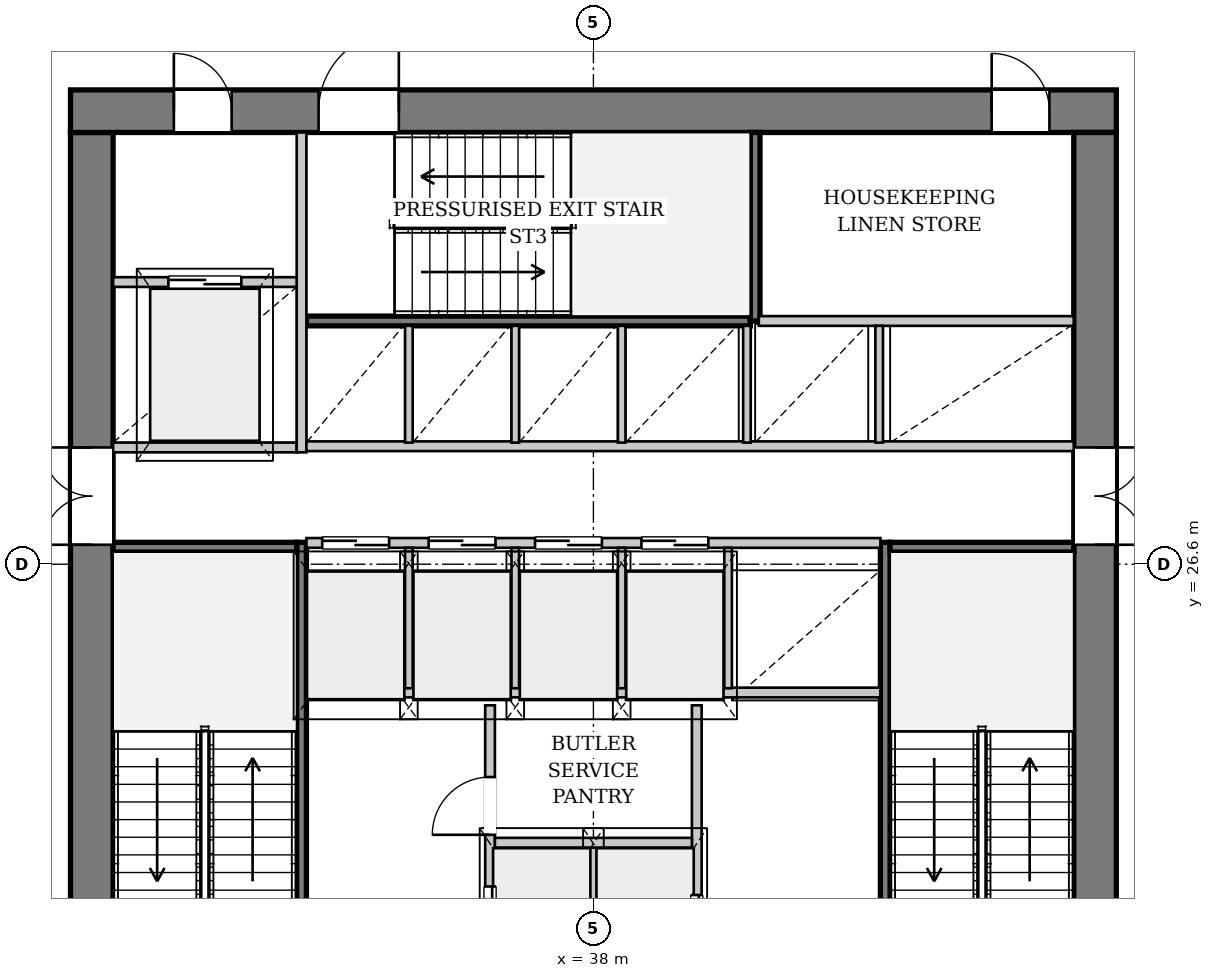
"""IFC4 building model, lengths in metres.
Left out: names, types, materials, properties, quantities, classifications, styles, units other than length and angle.
Written with IfcOpenShell. Run it as: python <this file> out.ifc"""

import sys

from ifc_helpers import new_model, si_unit, direction, frame, frame_2d, origin, place, context, subcontext, project, spatial, rectangle, extrude, source, transform, mapped, element, fill, save


model = new_model("IFC4")
c1 = context("Model", 3, precision=1e-05, world=origin(), true_north=direction((0.0, 1.0)))
c2 = subcontext(c1, "Body", "Model", "MODEL_VIEW")
j1 = project(units=[si_unit("LENGTHUNIT", "METRE"), si_unit("PLANEANGLEUNIT", "RADIAN")], contexts=[c1])
p1 = place(None, origin())
s1 = spatial("IfcSite", under=j1, at=p1, CompositionType="ELEMENT")
p2 = place(p1, origin())
s2 = spatial("IfcBuilding", under=s1, at=p2, CompositionType="ELEMENT")
p3 = place(p2, frame((0.0, 0.0, 123.45)))
s3 = spatial("IfcBuildingStorey", under=s2, at=p3, CompositionType="ELEMENT", Elevation=123.45)
p4 = place(p3, frame((29.75, 19.5, 0.0), z_axis=(0.0, 0.0, 1.0), x_axis=(0.0, 1.0, 0.0)))
e1 = element("IfcWall", 1, at=p4, inside=s3, PredefinedType="SHEAR", context=c2, shape_type="SweptSolid", body=[
    extrude(rectangle(XDim=14.2, YDim=0.7, at=frame_2d((7.1, 0.0))), origin(), (0.0, 0.0, 1.0), 3.3),
])
p5 = place(p4, frame((7.42, 0.0, 0.0)))
e2 = element("IfcOpeningElement", 2, at=p5, cuts=e1, PredefinedType="OPENING", context=c2, shape_type="SweptSolid", body=[
    extrude(rectangle(XDim=1.6, YDim=2.2, at=frame_2d((0.8, 1.1))), frame((0.0, 0.36, 0.0), z_axis=(0.0, -1.0, 0.0), x_axis=(1.0, 0.0, 0.0)), (0.0, 0.0, 1.0), 0.72),
])
p6 = place(p3, frame((29.4, 34.05, 0.0), z_axis=(0.0, 0.0, 1.0), x_axis=(1.0, 0.0, 0.0)))
e3 = element("IfcWall", 3, at=p6, inside=s3, PredefinedType="SHEAR", context=c2, shape_type="SweptSolid", body=[
    extrude(rectangle(XDim=17.2, YDim=0.7, at=frame_2d((8.6, 0.0))), origin(), (0.0, 0.0, 1.0), 3.3),
])
p7 = place(p6, frame((1.7, 0.0, 0.0)))
e4 = element("IfcOpeningElement", 4, at=p7, cuts=e3, PredefinedType="OPENING", context=c2, shape_type="SweptSolid", body=[
    extrude(rectangle(XDim=0.95, YDim=2.1, at=frame_2d((0.475, 1.05))), frame((0.0, 0.36, 0.0), z_axis=(0.0, -1.0, 0.0), x_axis=(1.0, 0.0, 0.0)), (0.0, 0.0, 1.0), 0.72),
])
p8 = place(p6, frame((4.08, 0.0, 0.0)))
e5 = element("IfcOpeningElement", 5, at=p8, cuts=e3, PredefinedType="OPENING", context=c2, shape_type="SweptSolid", body=[
    extrude(rectangle(XDim=1.32, YDim=2.2, at=frame_2d((0.66, 1.1))), frame((0.0, 0.36, 0.0), z_axis=(0.0, -1.0, 0.0), x_axis=(1.0, 0.0, 0.0)), (0.0, 0.0, 1.0), 0.72),
])
p9 = place(p6, frame((15.15, 0.0, 0.0)))
e6 = element("IfcOpeningElement", 6, at=p9, cuts=e3, PredefinedType="OPENING", context=c2, shape_type="SweptSolid", body=[
    extrude(rectangle(XDim=0.95, YDim=2.1, at=frame_2d((0.475, 1.05))), frame((0.0, 0.36, 0.0), z_axis=(0.0, -1.0, 0.0), x_axis=(1.0, 0.0, 0.0)), (0.0, 0.0, 1.0), 0.72),
])
p10 = place(p3, frame((46.25, 33.7, 0.0), z_axis=(0.0, 0.0, 1.0), x_axis=(0.0, -1.0, 0.0)))
e7 = element("IfcWall", 7, at=p10, inside=s3, PredefinedType="SHEAR", context=c2, shape_type="SweptSolid", body=[
    extrude(rectangle(XDim=14.2, YDim=0.7, at=frame_2d((7.1, 0.0))), origin(), (0.0, 0.0, 1.0), 3.3),
])
p11 = place(p10, frame((5.18, 0.0, 0.0)))
e8 = element("IfcOpeningElement", 8, at=p11, cuts=e7, PredefinedType="OPENING", context=c2, shape_type="SweptSolid", body=[
    extrude(rectangle(XDim=1.6, YDim=2.2, at=frame_2d((0.8, 1.1))), frame((0.0, 0.36, 0.0), z_axis=(0.0, -1.0, 0.0), x_axis=(1.0, 0.0, 0.0)), (0.0, 0.0, 1.0), 0.72),
])
p12 = place(p3, frame((33.2, 19.5, 0.0), z_axis=(0.0, 0.0, 1.0), x_axis=(0.0, 1.0, 0.0)))
e9 = element("IfcWall", 9, at=p12, inside=s3, PredefinedType="PARTITIONING", context=c2, shape_type="SweptSolid", body=[
    extrude(rectangle(XDim=7.46, YDim=0.16, at=frame_2d((3.73, 0.0))), origin(), (0.0, 0.0, 1.0), 3.3),
])
p13 = place(p12, frame((0.08, 0.0, 0.0)))
e10 = element("IfcOpeningElement", 10, at=p13, cuts=e9, PredefinedType="OPENING", context=c2, shape_type="SweptSolid", body=[
    extrude(rectangle(XDim=1.32, YDim=2.2, at=frame_2d((0.66, 1.1))), frame((0.0, 0.09, 0.0), z_axis=(0.0, -1.0, 0.0), x_axis=(1.0, 0.0, 0.0)), (0.0, 0.0, 1.0), 0.18),
])
p14 = place(p3, frame((30.1, 26.88, 0.0), z_axis=(0.0, 0.0, 1.0), x_axis=(1.0, 0.0, 0.0)))
e11 = element("IfcWall", 11, at=p14, inside=s3, PredefinedType="PARTITIONING", context=c2, shape_type="SweptSolid", body=[
    extrude(rectangle(XDim=3.02, YDim=0.16, at=frame_2d((1.51, 0.0))), origin(), (0.0, 0.0, 1.0), 3.3),
])
p15 = place(p3, frame((42.8, 26.96, 0.0), z_axis=(0.0, 0.0, 1.0), x_axis=(0.0, -1.0, 0.0)))
e12 = element("IfcWall", 12, at=p15, inside=s3, PredefinedType="PARTITIONING", context=c2, shape_type="SweptSolid", body=[
    extrude(rectangle(XDim=7.46, YDim=0.16, at=frame_2d((3.73, 0.0))), origin(), (0.0, 0.0, 1.0), 3.3),
])
p16 = place(p15, frame((6.06, 0.0, 0.0)))
e13 = element("IfcOpeningElement", 13, at=p16, cuts=e12, PredefinedType="OPENING", context=c2, shape_type="SweptSolid", body=[
    extrude(rectangle(XDim=1.32, YDim=2.2, at=frame_2d((0.66, 1.1))), frame((0.0, 0.09, 0.0), z_axis=(0.0, -1.0, 0.0), x_axis=(1.0, 0.0, 0.0)), (0.0, 0.0, 1.0), 0.18),
])
p17 = place(p3, frame((42.88, 26.88, 0.0), z_axis=(0.0, 0.0, 1.0), x_axis=(1.0, 0.0, 0.0)))
e14 = element("IfcWall", 14, at=p17, inside=s3, PredefinedType="PARTITIONING", context=c2, shape_type="SweptSolid", body=[
    extrude(rectangle(XDim=3.02, YDim=0.16, at=frame_2d((1.51, 0.0))), origin(), (0.0, 0.0, 1.0), 3.3),
])
p18 = place(p3, frame((33.28, 30.6, 0.0), z_axis=(0.0, 0.0, 1.0), x_axis=(1.0, 0.0, 0.0)))
e15 = element("IfcWall", 15, at=p18, inside=s3, PredefinedType="PARTITIONING", context=c2, shape_type="SweptSolid", body=[
    extrude(rectangle(XDim=7.3, YDim=0.16, at=frame_2d((3.65, 0.0))), origin(), (0.0, 0.0, 1.0), 3.3),
])
p19 = place(p3, frame((40.66, 30.6, 0.0), z_axis=(0.0, 0.0, 1.0), x_axis=(0.0, 1.0, 0.0)))
e16 = element("IfcWall", 16, at=p19, inside=s3, PredefinedType="PARTITIONING", context=c2, shape_type="SweptSolid", body=[
    extrude(rectangle(XDim=3.1, YDim=0.16, at=frame_2d((1.55, 0.0))), origin(), (0.0, 0.0, 1.0), 3.3),
])
p20 = place(p3, frame((36.3, 19.5, 0.0), z_axis=(0.0, 0.0, 1.0), x_axis=(0.0, 1.0, 0.0)))
e17 = element("IfcWall", 17, at=p20, inside=s3, PredefinedType="PARTITIONING", context=c2, shape_type="SweptSolid", body=[
    extrude(rectangle(XDim=4.78, YDim=0.16, at=frame_2d((2.39, 0.0))), origin(), (0.0, 0.0, 1.0), 3.3),
])
p21 = place(p20, frame((0.6, 0.0, 0.0)))
e18 = element("IfcOpeningElement", 18, at=p21, cuts=e17, PredefinedType="OPENING", context=c2, shape_type="SweptSolid", body=[
    extrude(rectangle(XDim=1.2, YDim=2.2, at=frame_2d((0.6, 1.1))), frame((0.0, 0.09, 0.0), z_axis=(0.0, -1.0, 0.0), x_axis=(1.0, 0.0, 0.0)), (0.0, 0.0, 1.0), 0.18),
])
p22 = place(p20, frame((2.65, 0.0, 0.0)))
e19 = element("IfcOpeningElement", 19, at=p22, cuts=e17, PredefinedType="OPENING", context=c2, shape_type="SweptSolid", body=[
    extrude(rectangle(XDim=0.95, YDim=2.1, at=frame_2d((0.475, 1.05))), frame((0.0, 0.09, 0.0), z_axis=(0.0, -1.0, 0.0), x_axis=(1.0, 0.0, 0.0)), (0.0, 0.0, 1.0), 0.18),
])
p23 = place(p3, frame((39.7, 24.28, 0.0), z_axis=(0.0, 0.0, 1.0), x_axis=(0.0, -1.0, 0.0)))
e20 = element("IfcWall", 20, at=p23, inside=s3, PredefinedType="PARTITIONING", context=c2, shape_type="SweptSolid", body=[
    extrude(rectangle(XDim=4.78, YDim=0.16, at=frame_2d((2.39, 0.0))), origin(), (0.0, 0.0, 1.0), 3.3),
])
p24 = place(p23, frame((3.12, 0.0, 0.0)))
e21 = element("IfcOpeningElement", 21, at=p24, cuts=e20, PredefinedType="OPENING", context=c2, shape_type="SweptSolid", body=[
    extrude(rectangle(XDim=1.2, YDim=2.2, at=frame_2d((0.6, 1.1))), frame((0.0, 0.09, 0.0), z_axis=(0.0, -1.0, 0.0), x_axis=(1.0, 0.0, 0.0)), (0.0, 0.0, 1.0), 0.18),
])
p25 = place(p3, frame((38.0, 19.5, 0.0), z_axis=(0.0, 0.0, 1.0), x_axis=(0.0, 1.0, 0.0)))
e22 = element("IfcWall", 22, at=p25, inside=s3, PredefinedType="PARTITIONING", context=c2, shape_type="SweptSolid", body=[
    extrude(rectangle(XDim=2.46, YDim=0.125, at=frame_2d((1.23, 0.0))), origin(), (0.0, 0.0, 1.0), 3.3),
])
p26 = place(p3, frame((36.38, 22.02, 0.0), z_axis=(0.0, 0.0, 1.0), x_axis=(1.0, 0.0, 0.0)))
e23 = element("IfcWall", 23, at=p26, inside=s3, PredefinedType="PARTITIONING", context=c2, shape_type="SweptSolid", body=[
    extrude(rectangle(XDim=3.24, YDim=0.16, at=frame_2d((1.62, 0.0))), origin(), (0.0, 0.0, 1.0), 3.3),
])
p27 = place(p3, frame((33.28, 24.49, 0.0), z_axis=(0.0, 0.0, 1.0), x_axis=(1.0, 0.0, 0.0)))
e24 = element("IfcWall", 24, at=p27, inside=s3, PredefinedType="PARTITIONING", context=c2, shape_type="SweptSolid", body=[
    extrude(rectangle(XDim=9.44, YDim=0.16, at=frame_2d((4.72, 0.0))), origin(), (0.0, 0.0, 1.0), 3.3),
])
p28 = place(p3, frame((30.1, 28.52, 0.0), z_axis=(0.0, 0.0, 1.0), x_axis=(1.0, 0.0, 0.0)))
e25 = element("IfcWall", 25, at=p28, inside=s3, PredefinedType="PARTITIONING", context=c2, shape_type="SweptSolid", body=[
    extrude(rectangle(XDim=3.02, YDim=0.16, at=frame_2d((1.51, 0.0))), origin(), (0.0, 0.0, 1.0), 3.3),
])
p29 = place(p3, frame((33.2, 28.44, 0.0), z_axis=(0.0, 0.0, 1.0), x_axis=(0.0, 1.0, 0.0)))
e26 = element("IfcWall", 26, at=p29, inside=s3, PredefinedType="PARTITIONING", context=c2, shape_type="SweptSolid", body=[
    extrude(rectangle(XDim=5.26, YDim=0.16, at=frame_2d((2.63, 0.0))), origin(), (0.0, 0.0, 1.0), 3.3),
])
p30 = place(p3, frame((30.1, 31.24, 0.0), z_axis=(0.0, 0.0, 1.0), x_axis=(1.0, 0.0, 0.0)))
e27 = element("IfcWall", 27, at=p30, inside=s3, PredefinedType="PARTITIONING", context=c2, shape_type="SweptSolid", body=[
    extrude(rectangle(XDim=3.02, YDim=0.16, at=frame_2d((1.51, 0.0))), origin(), (0.0, 0.0, 1.0), 3.3),
])
p31 = place(p30, frame((0.91, 0.0, 0.0)))
e28 = element("IfcOpeningElement", 28, at=p31, cuts=e27, PredefinedType="OPENING", context=c2, shape_type="SweptSolid", body=[
    extrude(rectangle(XDim=1.2, YDim=2.2, at=frame_2d((0.6, 1.1))), frame((0.0, 0.09, 0.0), z_axis=(0.0, -1.0, 0.0), x_axis=(1.0, 0.0, 0.0)), (0.0, 0.0, 1.0), 0.18),
])
p32 = place(p3, frame((33.28, 26.95, 0.0), z_axis=(0.0, 0.0, 1.0), x_axis=(1.0, 0.0, 0.0)))
e29 = element("IfcWall", 29, at=p32, inside=s3, PredefinedType="PARTITIONING", context=c2, shape_type="SweptSolid", body=[
    extrude(rectangle(XDim=9.44, YDim=0.16, at=frame_2d((4.72, 0.0))), origin(), (0.0, 0.0, 1.0), 3.3),
])
p33 = place(p32, frame((0.26, 0.0, 0.0)))
e30 = element("IfcOpeningElement", 30, at=p33, cuts=e29, PredefinedType="OPENING", context=c2, shape_type="SweptSolid", body=[
    extrude(rectangle(XDim=1.1, YDim=2.2, at=frame_2d((0.55, 1.1))), frame((0.0, 0.09, 0.0), z_axis=(0.0, -1.0, 0.0), x_axis=(1.0, 0.0, 0.0)), (0.0, 0.0, 1.0), 0.18),
])
p34 = place(p32, frame((2.01, 0.0, 0.0)))
e31 = element("IfcOpeningElement", 31, at=p34, cuts=e29, PredefinedType="OPENING", context=c2, shape_type="SweptSolid", body=[
    extrude(rectangle(XDim=1.1, YDim=2.2, at=frame_2d((0.55, 1.1))), frame((0.0, 0.09, 0.0), z_axis=(0.0, -1.0, 0.0), x_axis=(1.0, 0.0, 0.0)), (0.0, 0.0, 1.0), 0.18),
])
p35 = place(p32, frame((3.76, 0.0, 0.0)))
e32 = element("IfcOpeningElement", 32, at=p35, cuts=e29, PredefinedType="OPENING", context=c2, shape_type="SweptSolid", body=[
    extrude(rectangle(XDim=1.1, YDim=2.2, at=frame_2d((0.55, 1.1))), frame((0.0, 0.09, 0.0), z_axis=(0.0, -1.0, 0.0), x_axis=(1.0, 0.0, 0.0)), (0.0, 0.0, 1.0), 0.18),
])
p36 = place(p32, frame((5.51, 0.0, 0.0)))
e33 = element("IfcOpeningElement", 33, at=p36, cuts=e29, PredefinedType="OPENING", context=c2, shape_type="SweptSolid", body=[
    extrude(rectangle(XDim=1.1, YDim=2.2, at=frame_2d((0.55, 1.1))), frame((0.0, 0.09, 0.0), z_axis=(0.0, -1.0, 0.0), x_axis=(1.0, 0.0, 0.0)), (0.0, 0.0, 1.0), 0.18),
])
for number, where, z_axis, x_axis in (
    (34, (34.965, 24.56, 0.0), (0.0, 0.0, 1.0), (0.0, 1.0, 0.0)),
    (35, (36.715, 24.56, 0.0), (0.0, 0.0, 1.0), (0.0, 1.0, 0.0)),
    (36, (38.465, 24.56, 0.0), (0.0, 0.0, 1.0), (0.0, 1.0, 0.0)),
    (37, (40.215, 24.56, 0.0), (0.0, 0.0, 1.0), (0.0, 1.0, 0.0)),
):
    element("IfcWall", number, at=place(p3, frame(where, z_axis=z_axis, x_axis=x_axis)), inside=s3, PredefinedType="PARTITIONING", context=c2, shape_type="SweptSolid", body=[
        extrude(rectangle(XDim=2.31, YDim=0.125, at=frame_2d((1.155, 0.0))), origin(), (0.0, 0.0, 1.0), 3.3),
    ])
p37 = place(p3, frame((33.28, 28.54, 0.0), z_axis=(0.0, 0.0, 1.0), x_axis=(1.0, 0.0, 0.0)))
e38 = element("IfcWall", 38, at=p37, inside=s3, PredefinedType="PARTITIONING", context=c2, shape_type="SweptSolid", body=[
    extrude(rectangle(XDim=12.62, YDim=0.16, at=frame_2d((6.31, 0.0))), origin(), (0.0, 0.0, 1.0), 3.3),
])
p38 = place(p3, frame((40.72, 30.6, 0.0), z_axis=(0.0, 0.0, 1.0), x_axis=(1.0, 0.0, 0.0)))
e39 = element("IfcWall", 39, at=p38, inside=s3, PredefinedType="PARTITIONING", context=c2, shape_type="SweptSolid", body=[
    extrude(rectangle(XDim=5.18, YDim=0.16, at=frame_2d((2.59, 0.0))), origin(), (0.0, 0.0, 1.0), 3.3),
])
for number, where, z_axis, x_axis in (
    (40, (34.965, 28.6, 0.0), (0.0, 0.0, 1.0), (0.0, 1.0, 0.0)),
    (41, (36.715, 28.6, 0.0), (0.0, 0.0, 1.0), (0.0, 1.0, 0.0)),
    (42, (38.465, 28.6, 0.0), (0.0, 0.0, 1.0), (0.0, 1.0, 0.0)),
    (43, (40.525, 28.6, 0.0), (0.0, 0.0, 1.0), (0.0, 1.0, 0.0)),
    (44, (42.7, 28.6, 0.0), (0.0, 0.0, 1.0), (0.0, 1.0, 0.0)),
):
    element("IfcWall", number, at=place(p3, frame(where, z_axis=z_axis, x_axis=x_axis)), inside=s3, PredefinedType="PARTITIONING", context=c2, shape_type="SweptSolid", body=[
        extrude(rectangle(XDim=1.92, YDim=0.125, at=frame_2d((0.96, 0.0))), origin(), (0.0, 0.0, 1.0), 3.3),
    ])
m1 = source(origin(), c2, "Body", "SweptSolid", [
    extrude(rectangle(XDim=1.6, YDim=2.2, at=frame_2d((0.8, 1.1))), frame((0.0, 0.025, 0.0), z_axis=(0.0, -1.0, 0.0), x_axis=(1.0, 0.0, 0.0)), (0.0, 0.0, 1.0), 0.05),
])
p39 = place(p5, origin())
e45 = element("IfcDoor", 45, at=p39, inside=s3, OperationType="DOUBLE_DOOR_SINGLE_SWING", PredefinedType="DOOR", context=c2, shape_type="MappedRepresentation", body=[
    mapped(m1, transform((0.0, 0.0, 0.0), x_axis=(1.0, 0.0, 0.0), y_axis=(0.0, 1.0, 0.0), z_axis=(0.0, 0.0, 1.0), scale=1.0)),
])
fill(e2, e45)
m2 = source(origin(), c2, "Body", "SweptSolid", [
    extrude(rectangle(XDim=0.95, YDim=2.1, at=frame_2d((0.475, 1.05))), frame((0.0, 0.025, 0.0), z_axis=(0.0, -1.0, 0.0), x_axis=(1.0, 0.0, 0.0)), (0.0, 0.0, 1.0), 0.05),
])
p40 = place(p7, origin())
e46 = element("IfcDoor", 46, at=p40, inside=s3, OperationType="SINGLE_SWING_LEFT", PredefinedType="DOOR", context=c2, shape_type="MappedRepresentation", body=[
    mapped(m2, transform((0.0, 0.0, 0.0), x_axis=(1.0, 0.0, 0.0), y_axis=(0.0, 1.0, 0.0), z_axis=(0.0, 0.0, 1.0), scale=1.0)),
])
fill(e4, e46)
m3 = source(origin(), c2, "Body", "SweptSolid", [
    extrude(rectangle(XDim=1.32, YDim=2.2, at=frame_2d((0.66, 1.1))), frame((0.0, 0.025, 0.0), z_axis=(0.0, -1.0, 0.0), x_axis=(1.0, 0.0, 0.0)), (0.0, 0.0, 1.0), 0.05),
])
p41 = place(p8, origin())
e47 = element("IfcDoor", 47, at=p41, inside=s3, OperationType="SINGLE_SWING_RIGHT", PredefinedType="DOOR", context=c2, shape_type="MappedRepresentation", body=[
    mapped(m3, transform((0.0, 0.0, 0.0), x_axis=(1.0, 0.0, 0.0), y_axis=(0.0, 1.0, 0.0), z_axis=(0.0, 0.0, 1.0), scale=1.0)),
])
fill(e5, e47)
p42 = place(p11, origin())
e48 = element("IfcDoor", 48, at=p42, inside=s3, OperationType="DOUBLE_DOOR_SINGLE_SWING", PredefinedType="DOOR", context=c2, shape_type="MappedRepresentation", body=[
    mapped(m1, transform((0.0, 0.0, 0.0), x_axis=(1.0, 0.0, 0.0), y_axis=(0.0, 1.0, 0.0), z_axis=(0.0, 0.0, 1.0), scale=1.0)),
])
fill(e8, e48)
m4 = source(origin(), c2, "Body", "SweptSolid", [
    extrude(rectangle(XDim=1.2, YDim=2.2, at=frame_2d((0.6, 1.1))), frame((0.0, 0.025, 0.0), z_axis=(0.0, -1.0, 0.0), x_axis=(1.0, 0.0, 0.0)), (0.0, 0.0, 1.0), 0.05),
])
p43 = place(p21, origin())
e49 = element("IfcDoor", 49, at=p43, inside=s3, OperationType="DOUBLE_DOOR_SLIDING", PredefinedType="DOOR", context=c2, shape_type="MappedRepresentation", body=[
    mapped(m4, transform((0.0, 0.0, 0.0), x_axis=(1.0, 0.0, 0.0), y_axis=(0.0, 1.0, 0.0), z_axis=(0.0, 0.0, 1.0), scale=1.0)),
])
fill(e18, e49)
p44 = place(p22, origin())
e50 = element("IfcDoor", 50, at=p44, inside=s3, OperationType="SINGLE_SWING_LEFT", PredefinedType="DOOR", context=c2, shape_type="MappedRepresentation", body=[
    mapped(m2, transform((0.0, 0.0, 0.0), x_axis=(1.0, 0.0, 0.0), y_axis=(0.0, 1.0, 0.0), z_axis=(0.0, 0.0, 1.0), scale=1.0)),
])
fill(e19, e50)
p45 = place(p24, origin())
e51 = element("IfcDoor", 51, at=p45, inside=s3, OperationType="DOUBLE_DOOR_SLIDING", PredefinedType="DOOR", context=c2, shape_type="MappedRepresentation", body=[
    mapped(m4, transform((0.0, 0.0, 0.0), x_axis=(1.0, 0.0, 0.0), y_axis=(0.0, 1.0, 0.0), z_axis=(0.0, 0.0, 1.0), scale=1.0)),
])
fill(e21, e51)
p46 = place(p31, origin())
e52 = element("IfcDoor", 52, at=p46, inside=s3, OperationType="DOUBLE_DOOR_SLIDING", PredefinedType="DOOR", context=c2, shape_type="MappedRepresentation", body=[
    mapped(m4, transform((0.0, 0.0, 0.0), x_axis=(1.0, 0.0, 0.0), y_axis=(0.0, 1.0, 0.0), z_axis=(0.0, 0.0, 1.0), scale=1.0)),
])
fill(e28, e52)
m5 = source(origin(), c2, "Body", "SweptSolid", [
    extrude(rectangle(XDim=1.1, YDim=2.2, at=frame_2d((0.55, 1.1))), frame((0.0, 0.025, 0.0), z_axis=(0.0, -1.0, 0.0), x_axis=(1.0, 0.0, 0.0)), (0.0, 0.0, 1.0), 0.05),
])
p47 = place(p33, origin())
e53 = element("IfcDoor", 53, at=p47, inside=s3, OperationType="DOUBLE_DOOR_SLIDING", PredefinedType="DOOR", context=c2, shape_type="MappedRepresentation", body=[
    mapped(m5, transform((0.0, 0.0, 0.0), x_axis=(1.0, 0.0, 0.0), y_axis=(0.0, 1.0, 0.0), z_axis=(0.0, 0.0, 1.0), scale=1.0)),
])
fill(e30, e53)
p48 = place(p34, origin())
e54 = element("IfcDoor", 54, at=p48, inside=s3, OperationType="DOUBLE_DOOR_SLIDING", PredefinedType="DOOR", context=c2, shape_type="MappedRepresentation", body=[
    mapped(m5, transform((0.0, 0.0, 0.0), x_axis=(1.0, 0.0, 0.0), y_axis=(0.0, 1.0, 0.0), z_axis=(0.0, 0.0, 1.0), scale=1.0)),
])
fill(e31, e54)
p49 = place(p35, origin())
e55 = element("IfcDoor", 55, at=p49, inside=s3, OperationType="DOUBLE_DOOR_SLIDING", PredefinedType="DOOR", context=c2, shape_type="MappedRepresentation", body=[
    mapped(m5, transform((0.0, 0.0, 0.0), x_axis=(1.0, 0.0, 0.0), y_axis=(0.0, 1.0, 0.0), z_axis=(0.0, 0.0, 1.0), scale=1.0)),
])
fill(e32, e55)
p50 = place(p36, origin())
e56 = element("IfcDoor", 56, at=p50, inside=s3, OperationType="DOUBLE_DOOR_SLIDING", PredefinedType="DOOR", context=c2, shape_type="MappedRepresentation", body=[
    mapped(m5, transform((0.0, 0.0, 0.0), x_axis=(1.0, 0.0, 0.0), y_axis=(0.0, 1.0, 0.0), z_axis=(0.0, 0.0, 1.0), scale=1.0)),
])
fill(e33, e56)
p51 = place(p9, origin())
e57 = element("IfcDoor", 57, at=p51, inside=s3, OperationType="SINGLE_SWING_LEFT", PredefinedType="DOOR", context=c2, shape_type="MappedRepresentation", body=[
    mapped(m2, transform((0.0, 0.0, 0.0), x_axis=(1.0, 0.0, 0.0), y_axis=(0.0, 1.0, 0.0), z_axis=(0.0, 0.0, 1.0), scale=1.0)),
])
fill(e6, e57)
save(model, sys.argv[1])
